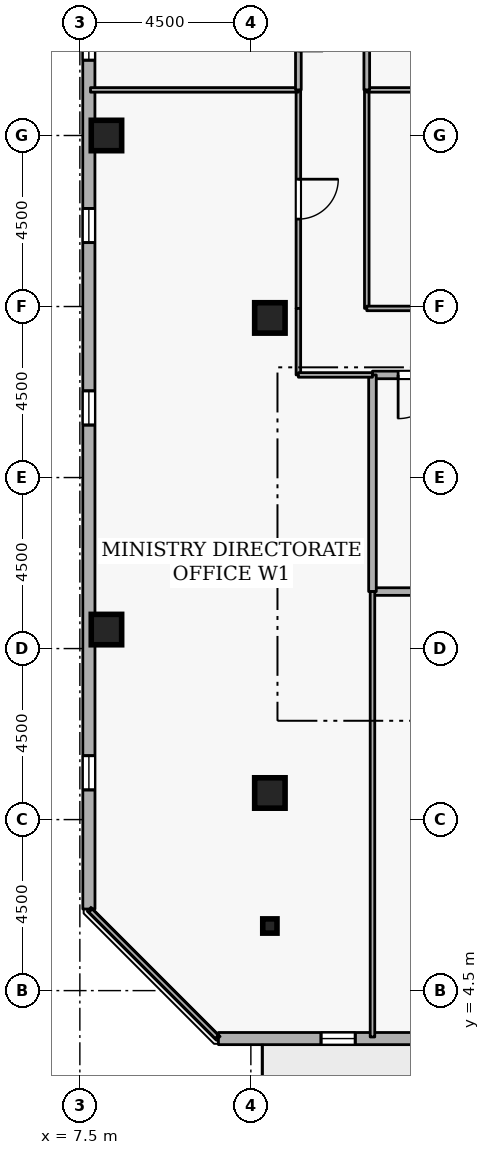
"""IFC4 building model, lengths in metres.
Left out: names, types, materials, properties, quantities, classifications, styles, units other than length and angle.
Written with IfcOpenShell. Run it as: python <this file> out.ifc"""

import sys

from ifc_helpers import new_model, si_unit, direction, frame, frame_2d, origin, origin_2d, place, context, subcontext, project, spatial, rectangle, i_section, extrude, element, fill, save


model = new_model("IFC4")
c1 = context("Model", 3, precision=1e-05, world=origin(), true_north=direction((0.0, 1.0)))
c2 = subcontext(c1, "Body", "Model", "MODEL_VIEW")
j1 = project(units=[si_unit("LENGTHUNIT", "METRE"), si_unit("PLANEANGLEUNIT", "RADIAN")], contexts=[c1])
p1 = place(None, origin())
s1 = spatial("IfcSite", under=j1, at=p1, CompositionType="ELEMENT")
p2 = place(p1, origin())
s2 = spatial("IfcBuilding", under=s1, at=p2, CompositionType="ELEMENT")
p3 = place(p2, frame((0.0, 0.0, 265.5)))
s3 = spatial("IfcBuildingStorey", under=s2, at=p3, CompositionType="ELEMENT", Elevation=265.5)
for number, where, z_axis, x_axis in (
    (1, (12.5, 9.7, 0.0), (0.0, 0.0, 1.0), (1.0, 0.0, 0.0)),
    (2, (8.2, 14.0, 0.0), (0.0, 0.0, 1.0), (1.0, 0.0, 0.0)),
    (3, (8.2, 27.0, 0.0), (0.0, 0.0, 1.0), (1.0, 0.0, 0.0)),
    (4, (12.5, 22.2, 0.0), (0.0, 0.0, 1.0), (1.0, 0.0, 0.0)),
):
    element("IfcColumn", number, at=place(p3, frame(where, z_axis=z_axis, x_axis=x_axis)), inside=s3, PredefinedType="COLUMN", context=c2, shape_type="SweptSolid", body=[
        extrude(rectangle(XDim=0.8, YDim=0.8, at=origin_2d()), origin(), (0.0, 0.0, 1.0), 3.6),
    ])
p4 = place(p3, frame((12.5, 6.2, 0.0), z_axis=(0.0, 0.0, 1.0), x_axis=(1.0, 0.0, 0.0)))
e5 = element("IfcColumn", 5, at=p4, inside=s3, PredefinedType="COLUMN", context=c2, shape_type="SweptSolid", body=[
    extrude(i_section(OverallWidth=0.375, OverallDepth=0.375, WebThickness=0.017, FlangeThickness=0.027, FilletRadius=0.015, at=origin_2d()), origin(), (0.0, 0.0, 1.0), 3.6),
])
p5 = place(p3, frame((11.146, 3.238, 0.0), z_axis=(0.0, 0.0, 1.0), x_axis=(0.999999997144, -7.5574884e-05, 0.0)))
e6 = element("IfcWall", 6, at=p5, inside=s3, PredefinedType="STANDARD", context=c2, shape_type="SweptSolid", body=[
    extrude(rectangle(XDim=35.535, YDim=0.32, at=frame_2d((17.768, 0.0))), origin(), (0.0, 0.0, 1.0), 2.7),
])
p6 = place(p5, frame((22.718, 0.0, 0.0)))
e7 = element("IfcOpeningElement", 7, at=p6, cuts=e6, PredefinedType="OPENING", context=c2, shape_type="SweptSolid", body=[
    extrude(rectangle(XDim=1.0, YDim=2.08, at=frame_2d((0.5, 1.04))), frame((0.0, 0.17, 0.0), z_axis=(0.0, -1.0, 0.0), x_axis=(1.0, 0.0, 0.0)), (0.0, 0.0, 1.0), 0.34),
])
p7 = place(p5, frame((2.7, 0.0, 0.72)))
e8 = element("IfcOpeningElement", 8, at=p7, cuts=e6, PredefinedType="OPENING", context=c2, shape_type="SweptSolid", body=[
    extrude(rectangle(XDim=0.9, YDim=1.75, at=frame_2d((0.45, 0.875))), frame((0.0, 0.17, 0.0), z_axis=(0.0, -1.0, 0.0), x_axis=(1.0, 0.0, 0.0)), (0.0, 0.0, 1.0), 0.34),
])
p8 = place(p5, frame((7.5, 0.0, 0.72)))
e9 = element("IfcOpeningElement", 9, at=p8, cuts=e6, PredefinedType="OPENING", context=c2, shape_type="SweptSolid", body=[
    extrude(rectangle(XDim=0.9, YDim=1.75, at=frame_2d((0.45, 0.875))), frame((0.0, 0.17, 0.0), z_axis=(0.0, -1.0, 0.0), x_axis=(1.0, 0.0, 0.0)), (0.0, 0.0, 1.0), 0.34),
])
p9 = place(p5, frame((12.3, 0.0, 0.72)))
e10 = element("IfcOpeningElement", 10, at=p9, cuts=e6, PredefinedType="OPENING", context=c2, shape_type="SweptSolid", body=[
    extrude(rectangle(XDim=0.9, YDim=1.75, at=frame_2d((0.45, 0.875))), frame((0.0, 0.17, 0.0), z_axis=(0.0, -1.0, 0.0), x_axis=(1.0, 0.0, 0.0)), (0.0, 0.0, 1.0), 0.34),
])
p10 = place(p5, frame((17.1, 0.0, 0.72)))
e11 = element("IfcOpeningElement", 11, at=p10, cuts=e6, PredefinedType="OPENING", context=c2, shape_type="SweptSolid", body=[
    extrude(rectangle(XDim=0.9, YDim=1.75, at=frame_2d((0.45, 0.875))), frame((0.0, 0.17, 0.0), z_axis=(0.0, -1.0, 0.0), x_axis=(1.0, 0.0, 0.0)), (0.0, 0.0, 1.0), 0.34),
])
p11 = place(p5, frame((26.7, 0.0, 0.72)))
e12 = element("IfcOpeningElement", 12, at=p11, cuts=e6, PredefinedType="OPENING", context=c2, shape_type="SweptSolid", body=[
    extrude(rectangle(XDim=0.9, YDim=1.75, at=frame_2d((0.45, 0.875))), frame((0.0, 0.17, 0.0), z_axis=(0.0, -1.0, 0.0), x_axis=(1.0, 0.0, 0.0)), (0.0, 0.0, 1.0), 0.34),
])
p12 = place(p5, frame((31.5, 0.0, 0.72)))
e13 = element("IfcOpeningElement", 13, at=p12, cuts=e6, PredefinedType="OPENING", context=c2, shape_type="SweptSolid", body=[
    extrude(rectangle(XDim=0.9, YDim=1.75, at=frame_2d((0.45, 0.875))), frame((0.0, 0.17, 0.0), z_axis=(0.0, -1.0, 0.0), x_axis=(1.0, 0.0, 0.0)), (0.0, 0.0, 1.0), 0.34),
])
p13 = place(p3, frame((7.735, 42.181, 0.0), z_axis=(0.0, 0.0, 1.0), x_axis=(7.5574884e-05, -0.999999997144, 0.0)))
e14 = element("IfcWall", 14, at=p13, inside=s3, PredefinedType="STANDARD", context=c2, shape_type="SweptSolid", body=[
    extrude(rectangle(XDim=35.535, YDim=0.32, at=frame_2d((17.768, 0.0))), origin(), (0.0, 0.0, 1.0), 2.7),
])
p14 = place(p13, frame((7.5, 0.0, 0.72)))
e15 = element("IfcOpeningElement", 15, at=p14, cuts=e14, PredefinedType="OPENING", context=c2, shape_type="SweptSolid", body=[
    extrude(rectangle(XDim=0.9, YDim=1.75, at=frame_2d((0.45, 0.875))), frame((0.0, 0.17, 0.0), z_axis=(0.0, -1.0, 0.0), x_axis=(1.0, 0.0, 0.0)), (0.0, 0.0, 1.0), 0.34),
])
p15 = place(p13, frame((12.3, 0.0, 0.72)))
e16 = element("IfcOpeningElement", 16, at=p15, cuts=e14, PredefinedType="OPENING", context=c2, shape_type="SweptSolid", body=[
    extrude(rectangle(XDim=0.9, YDim=1.75, at=frame_2d((0.45, 0.875))), frame((0.0, 0.17, 0.0), z_axis=(0.0, -1.0, 0.0), x_axis=(1.0, 0.0, 0.0)), (0.0, 0.0, 1.0), 0.34),
])
p16 = place(p13, frame((17.1, 0.0, 0.72)))
e17 = element("IfcOpeningElement", 17, at=p16, cuts=e14, PredefinedType="OPENING", context=c2, shape_type="SweptSolid", body=[
    extrude(rectangle(XDim=0.9, YDim=1.75, at=frame_2d((0.45, 0.875))), frame((0.0, 0.17, 0.0), z_axis=(0.0, -1.0, 0.0), x_axis=(1.0, 0.0, 0.0)), (0.0, 0.0, 1.0), 0.34),
])
p17 = place(p13, frame((21.9, 0.0, 0.72)))
e18 = element("IfcOpeningElement", 18, at=p17, cuts=e14, PredefinedType="OPENING", context=c2, shape_type="SweptSolid", body=[
    extrude(rectangle(XDim=0.9, YDim=1.75, at=frame_2d((0.45, 0.875))), frame((0.0, 0.17, 0.0), z_axis=(0.0, -1.0, 0.0), x_axis=(1.0, 0.0, 0.0)), (0.0, 0.0, 1.0), 0.34),
])
p18 = place(p13, frame((31.5, 0.0, 0.72)))
e19 = element("IfcOpeningElement", 19, at=p18, cuts=e14, PredefinedType="OPENING", context=c2, shape_type="SweptSolid", body=[
    extrude(rectangle(XDim=0.9, YDim=1.75, at=frame_2d((0.45, 0.875))), frame((0.0, 0.17, 0.0), z_axis=(0.0, -1.0, 0.0), x_axis=(1.0, 0.0, 0.0)), (0.0, 0.0, 1.0), 0.34),
])
p19 = place(p3, frame((15.2, 15.0, 0.0), z_axis=(0.0, 0.0, 1.0), x_axis=(1.0, 0.0, 0.0)))
e20 = element("IfcWall", 20, at=p19, inside=s3, PredefinedType="STANDARD", context=c2, shape_type="SweptSolid", body=[
    extrude(rectangle(XDim=2.5, YDim=0.2, at=frame_2d((1.25, 0.0))), origin(), (0.0, 0.0, 1.0), 3.34),
])
p20 = place(p3, frame((17.7, 20.7, 0.0), z_axis=(0.0, 0.0, 1.0), x_axis=(-1.0, 0.0, 0.0)))
e21 = element("IfcWall", 21, at=p20, inside=s3, PredefinedType="STANDARD", context=c2, shape_type="SweptSolid", body=[
    extrude(rectangle(XDim=2.5, YDim=0.2, at=frame_2d((1.25, 0.0))), origin(), (0.0, 0.0, 1.0), 3.34),
])
p21 = place(p20, frame((0.675, 0.0, 0.0)))
e22 = element("IfcOpeningElement", 22, at=p21, cuts=e21, PredefinedType="OPENING", context=c2, shape_type="SweptSolid", body=[
    extrude(rectangle(XDim=1.15, YDim=2.1, at=frame_2d((0.575, 1.05))), frame((0.0, 0.11, 0.0), z_axis=(0.0, -1.0, 0.0), x_axis=(1.0, 0.0, 0.0)), (0.0, 0.0, 1.0), 0.22),
])
p22 = place(p3, frame((15.2, 20.7, 0.0), z_axis=(0.0, 0.0, 1.0), x_axis=(0.0, -1.0, 0.0)))
e23 = element("IfcWall", 23, at=p22, inside=s3, PredefinedType="STANDARD", context=c2, shape_type="SweptSolid", body=[
    extrude(rectangle(XDim=5.7, YDim=0.2, at=frame_2d((2.85, 0.0))), origin(), (0.0, 0.0, 1.0), 3.34),
])
p23 = place(p3, frame((13.25, 28.2, 0.0), z_axis=(0.0, 0.0, 1.0), x_axis=(0.0, -1.0, 0.0)))
e24 = element("IfcWall", 24, at=p23, inside=s3, PredefinedType="PARTITIONING", context=c2, shape_type="SweptSolid", body=[
    extrude(rectangle(XDim=5.75, YDim=0.12, at=frame_2d((2.875, 0.0))), origin(), (0.0, 0.0, 1.0), 3.34),
])
p24 = place(p23, frame((2.35, 0.0, 0.0)))
e25 = element("IfcOpeningElement", 25, at=p24, cuts=e24, PredefinedType="OPENING", context=c2, shape_type="SweptSolid", body=[
    extrude(rectangle(XDim=1.05, YDim=2.1, at=frame_2d((0.525, 1.05))), frame((0.0, 0.07, 0.0), z_axis=(0.0, -1.0, 0.0), x_axis=(1.0, 0.0, 0.0)), (0.0, 0.0, 1.0), 0.14),
])
p25 = place(p3, frame((13.25, 22.45, 0.0), z_axis=(0.0, 0.0, 1.0), x_axis=(0.0, -1.0, 0.0)))
e26 = element("IfcWall", 26, at=p25, inside=s3, PredefinedType="PARTITIONING", context=c2, shape_type="SweptSolid", body=[
    extrude(rectangle(XDim=1.75, YDim=0.12, at=frame_2d((0.875, 0.0))), origin(), (0.0, 0.0, 1.0), 3.34),
])
p26 = place(p3, frame((13.25, 20.7, 0.0), z_axis=(0.0, 0.0, 1.0), x_axis=(1.0, 0.0, 0.0)))
e27 = element("IfcWall", 27, at=p26, inside=s3, PredefinedType="PARTITIONING", context=c2, shape_type="SweptSolid", body=[
    extrude(rectangle(XDim=1.95, YDim=0.12, at=frame_2d((0.975, 0.0))), origin(), (0.0, 0.0, 1.0), 3.34),
])
p27 = place(p3, frame((15.2, 15.0, 0.0), z_axis=(0.0, 0.0, 1.0), x_axis=(0.0, -1.0, 0.0)))
e28 = element("IfcWall", 28, at=p27, inside=s3, PredefinedType="PARTITIONING", context=c2, shape_type="SweptSolid", body=[
    extrude(rectangle(XDim=11.72, YDim=0.12, at=frame_2d((5.86, 0.0))), origin(), (0.0, 0.0, 1.0), 3.34),
])
p28 = place(p3, frame((11.106, 3.28, 0.0), z_axis=(0.0, 0.0, 1.0), x_axis=(-0.707106781187, 0.707106781187, 0.0)))
e29 = element("IfcWall", 29, at=p28, inside=s3, PredefinedType="PARTITIONING", context=c2, shape_type="SweptSolid", body=[
    extrude(rectangle(XDim=4.703, YDim=0.12, at=frame_2d((2.352, 0.0))), origin(), (0.0, 0.0, 1.0), 3.34),
])
p29 = place(p3, frame((7.78, 28.2, 0.0), z_axis=(0.0, 0.0, 1.0), x_axis=(1.0, 0.0, 0.0)))
e30 = element("IfcWall", 30, at=p29, inside=s3, PredefinedType="PARTITIONING", context=c2, shape_type="SweptSolid", body=[
    extrude(rectangle(XDim=5.47, YDim=0.12, at=frame_2d((2.735, 0.0))), origin(), (0.0, 0.0, 1.0), 3.34),
])
p30 = place(p3, frame((13.25, 31.55, 0.0), z_axis=(0.0, 0.0, 1.0), x_axis=(0.0, -1.0, 0.0)))
e31 = element("IfcWall", 31, at=p30, inside=s3, PredefinedType="PARTITIONING", context=c2, shape_type="SweptSolid", body=[
    extrude(rectangle(XDim=3.35, YDim=0.15, at=frame_2d((1.675, 0.0))), origin(), (0.0, 0.0, 1.0), 3.34),
])
p31 = place(p30, frame((1.025, 0.0, 0.0)))
e32 = element("IfcOpeningElement", 32, at=p31, cuts=e31, PredefinedType="OPENING", context=c2, shape_type="SweptSolid", body=[
    extrude(rectangle(XDim=1.3, YDim=2.12, at=frame_2d((0.65, 1.06))), frame((0.0, 0.085, 0.0), z_axis=(0.0, -1.0, 0.0), x_axis=(1.0, 0.0, 0.0)), (0.0, 0.0, 1.0), 0.17),
])
p32 = place(p3, frame((15.05, 22.45, 0.0), z_axis=(0.0, 0.0, 1.0), x_axis=(0.0, 1.0, 0.0)))
e33 = element("IfcWall", 33, at=p32, inside=s3, PredefinedType="PARTITIONING", context=c2, shape_type="SweptSolid", body=[
    extrude(rectangle(XDim=5.75, YDim=0.12, at=frame_2d((2.875, 0.0))), origin(), (0.0, 0.0, 1.0), 3.34),
])
p33 = place(p3, frame((15.05, 28.2, 0.0), z_axis=(0.0, 0.0, 1.0), x_axis=(1.0, 0.0, 0.0)))
e34 = element("IfcWall", 34, at=p33, inside=s3, PredefinedType="PARTITIONING", context=c2, shape_type="SweptSolid", body=[
    extrude(rectangle(XDim=5.85, YDim=0.12, at=frame_2d((2.925, 0.0))), origin(), (0.0, 0.0, 1.0), 3.34),
])
p34 = place(p3, frame((20.9, 22.45, 0.0), z_axis=(0.0, 0.0, 1.0), x_axis=(-1.0, 0.0, 0.0)))
e35 = element("IfcWall", 35, at=p34, inside=s3, PredefinedType="PARTITIONING", context=c2, shape_type="SweptSolid", body=[
    extrude(rectangle(XDim=5.85, YDim=0.12, at=frame_2d((2.925, 0.0))), origin(), (0.0, 0.0, 1.0), 3.34),
])
p35 = place(p34, frame((2.45, 0.0, 0.0)))
e36 = element("IfcOpeningElement", 36, at=p35, cuts=e35, PredefinedType="OPENING", context=c2, shape_type="SweptSolid", body=[
    extrude(rectangle(XDim=0.95, YDim=2.1, at=frame_2d((0.475, 1.05))), frame((0.0, 0.07, 0.0), z_axis=(0.0, -1.0, 0.0), x_axis=(1.0, 0.0, 0.0)), (0.0, 0.0, 1.0), 0.14),
])
p36 = place(p3, frame((15.05, 28.2, 0.0), z_axis=(0.0, 0.0, 1.0), x_axis=(0.0, 1.0, 0.0)))
e37 = element("IfcWall", 37, at=p36, inside=s3, PredefinedType="PARTITIONING", context=c2, shape_type="SweptSolid", body=[
    extrude(rectangle(XDim=3.35, YDim=0.15, at=frame_2d((1.675, 0.0))), origin(), (0.0, 0.0, 1.0), 3.34),
])
p37 = place(p7, origin())
e38 = element("IfcWindow", 38, at=p37, inside=s3, PartitioningType="SINGLE_PANEL", PredefinedType="WINDOW", context=c2, shape_type="SweptSolid", body=[
    extrude(rectangle(XDim=0.9, YDim=1.75, at=frame_2d((0.45, 0.875))), frame((0.0, 0.03, 0.0), z_axis=(0.0, -1.0, 0.0), x_axis=(1.0, 0.0, 0.0)), (0.0, 0.0, 1.0), 0.06),
])
fill(e8, e38)
p38 = place(p15, origin())
e39 = element("IfcWindow", 39, at=p38, inside=s3, PartitioningType="SINGLE_PANEL", PredefinedType="WINDOW", context=c2, shape_type="SweptSolid", body=[
    extrude(rectangle(XDim=0.9, YDim=1.75, at=frame_2d((0.45, 0.875))), frame((0.0, 0.03, 0.0), z_axis=(0.0, -1.0, 0.0), x_axis=(1.0, 0.0, 0.0)), (0.0, 0.0, 1.0), 0.06),
])
fill(e16, e39)
p39 = place(p16, origin())
e40 = element("IfcWindow", 40, at=p39, inside=s3, PartitioningType="SINGLE_PANEL", PredefinedType="WINDOW", context=c2, shape_type="SweptSolid", body=[
    extrude(rectangle(XDim=0.9, YDim=1.75, at=frame_2d((0.45, 0.875))), frame((0.0, 0.03, 0.0), z_axis=(0.0, -1.0, 0.0), x_axis=(1.0, 0.0, 0.0)), (0.0, 0.0, 1.0), 0.06),
])
fill(e17, e40)
p40 = place(p17, origin())
e41 = element("IfcWindow", 41, at=p40, inside=s3, PartitioningType="SINGLE_PANEL", PredefinedType="WINDOW", context=c2, shape_type="SweptSolid", body=[
    extrude(rectangle(XDim=0.9, YDim=1.75, at=frame_2d((0.45, 0.875))), frame((0.0, 0.03, 0.0), z_axis=(0.0, -1.0, 0.0), x_axis=(1.0, 0.0, 0.0)), (0.0, 0.0, 1.0), 0.06),
])
fill(e18, e41)
p41 = place(p18, origin())
e42 = element("IfcWindow", 42, at=p41, inside=s3, PartitioningType="SINGLE_PANEL", PredefinedType="WINDOW", context=c2, shape_type="SweptSolid", body=[
    extrude(rectangle(XDim=0.9, YDim=1.75, at=frame_2d((0.45, 0.875))), frame((0.0, 0.03, 0.0), z_axis=(0.0, -1.0, 0.0), x_axis=(1.0, 0.0, 0.0)), (0.0, 0.0, 1.0), 0.06),
])
fill(e19, e42)
p42 = place(p21, origin())
e43 = element("IfcDoor", 43, at=p42, inside=s3, OperationType="SINGLE_SWING_RIGHT", PredefinedType="DOOR", context=c2, shape_type="SweptSolid", body=[
    extrude(rectangle(XDim=1.15, YDim=2.1, at=frame_2d((0.575, 1.05))), frame((0.0, 0.025, 0.0), z_axis=(0.0, -1.0, 0.0), x_axis=(1.0, 0.0, 0.0)), (0.0, 0.0, 1.0), 0.05),
])
fill(e22, e43)
p43 = place(p24, origin())
e44 = element("IfcDoor", 44, at=p43, inside=s3, OperationType="SINGLE_SWING_LEFT", PredefinedType="DOOR", context=c2, shape_type="SweptSolid", body=[
    extrude(rectangle(XDim=1.05, YDim=2.1, at=frame_2d((0.525, 1.05))), frame((0.0, 0.025, 0.0), z_axis=(0.0, -1.0, 0.0), x_axis=(1.0, 0.0, 0.0)), (0.0, 0.0, 1.0), 0.05),
])
fill(e25, e44)
save(model, sys.argv[1])
